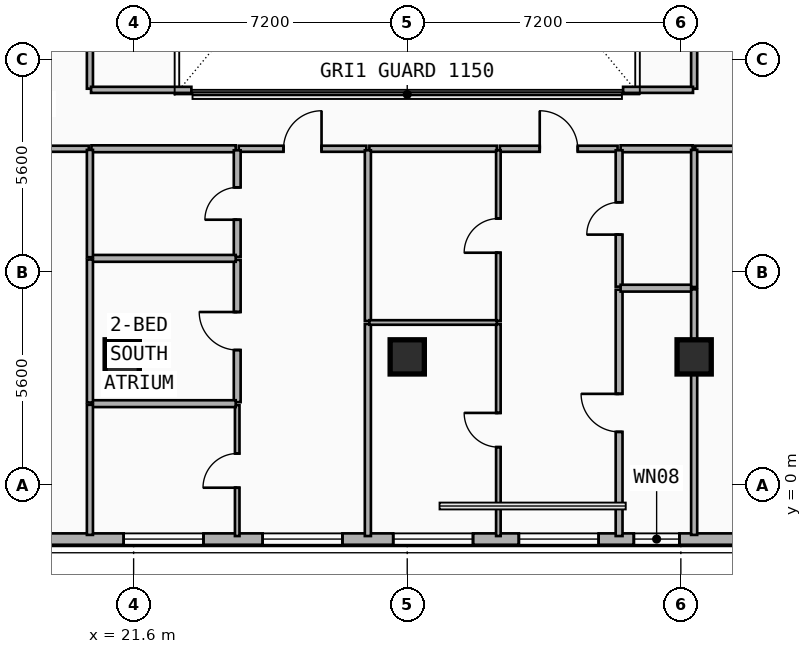
"""IFC4 building model, lengths in metres.
Left out: names, types, materials, properties, quantities, classifications, styles, units other than length and angle.
Written with IfcOpenShell. Run it as: python <this file> out.ifc"""

import sys

from ifc_helpers import new_model, si_unit, direction, frame, frame_2d, origin, origin_2d, place, context, subcontext, project, spatial, rectangle, extrude, element, fill, save


model = new_model("IFC4")
c1 = context("Model", 3, precision=1e-05, world=origin(), true_north=direction((0.0, 1.0)))
c2 = subcontext(c1, "Body", "Model", "MODEL_VIEW")
j1 = project(units=[si_unit("LENGTHUNIT", "METRE"), si_unit("PLANEANGLEUNIT", "RADIAN")], contexts=[c1])
p1 = place(None, origin())
s1 = spatial("IfcSite", under=j1, at=p1, CompositionType="ELEMENT")
p2 = place(p1, origin())
s2 = spatial("IfcBuilding", under=s1, at=p2, CompositionType="ELEMENT")
p3 = place(p2, frame((0.0, 0.0, 251.0)))
s3 = spatial("IfcBuildingStorey", under=s2, at=p3, CompositionType="ELEMENT", Elevation=251.0)
for number, where, z_axis, x_axis in (
    (1, (21.3, 3.482, 0.0), (0.0, -0.09, 0.996), (1.0, 0.0, 0.0)),
    (2, (28.8, 3.482, 0.0), (0.0, -0.09, 0.996), (1.0, 0.0, 0.0)),
    (3, (36.35, 3.482, 0.0), (0.0, -0.09, 0.996), (1.0, 0.0, 0.0)),
):
    element("IfcColumn", number, at=place(p3, frame(where, z_axis=z_axis, x_axis=x_axis)), inside=s3, PredefinedType="COLUMN", context=c2, shape_type="SweptSolid", body=[
        extrude(rectangle(XDim=0.9, YDim=0.9, at=origin_2d()), origin(), (0.0, 0.0, 1.0), 3.715),
    ])
p4 = place(p3, frame((45.2, -1.42, 0.0), z_axis=(0.0, 0.0, 1.0), x_axis=(-1.0, 0.0, 0.0)))
e4 = element("IfcWall", 4, at=p4, inside=s3, PredefinedType="SOLIDWALL", context=c2, shape_type="SweptSolid", body=[
    extrude(rectangle(XDim=32.8, YDim=0.3, at=frame_2d((16.4, 0.0))), origin(), (0.0, 0.0, 1.0), 3.42),
])
p5 = place(p4, frame((29.071, 0.0, 0.75)))
e5 = element("IfcOpeningElement", 5, at=p5, cuts=e4, PredefinedType="OPENING", context=c2, shape_type="SweptSolid", body=[
    extrude(rectangle(XDim=2.1, YDim=2.1, at=frame_2d((1.05, 1.05))), frame((0.0, 0.16, 0.0), z_axis=(0.0, -1.0, 0.0), x_axis=(1.0, 0.0, 0.0)), (0.0, 0.0, 1.0), 0.32),
])
p6 = place(p4, frame((26.745, 0.0, 0.75)))
e6 = element("IfcOpeningElement", 6, at=p6, cuts=e4, PredefinedType="OPENING", context=c2, shape_type="SweptSolid", body=[
    extrude(rectangle(XDim=1.6, YDim=1.95, at=frame_2d((0.8, 0.975))), frame((0.0, 0.16, 0.0), z_axis=(0.0, -1.0, 0.0), x_axis=(1.0, 0.0, 0.0)), (0.0, 0.0, 1.0), 0.32),
])
p7 = place(p4, frame((18.105, 0.0, 0.75)))
e7 = element("IfcOpeningElement", 7, at=p7, cuts=e4, PredefinedType="OPENING", context=c2, shape_type="SweptSolid", body=[
    extrude(rectangle(XDim=2.1, YDim=2.1, at=frame_2d((1.05, 1.05))), frame((0.0, 0.16, 0.0), z_axis=(0.0, -1.0, 0.0), x_axis=(1.0, 0.0, 0.0)), (0.0, 0.0, 1.0), 0.32),
])
p8 = place(p4, frame((21.762, 0.0, 0.75)))
e8 = element("IfcOpeningElement", 8, at=p8, cuts=e4, PredefinedType="OPENING", context=c2, shape_type="SweptSolid", body=[
    extrude(rectangle(XDim=2.1, YDim=2.1, at=frame_2d((1.05, 1.05))), frame((0.0, 0.16, 0.0), z_axis=(0.0, -1.0, 0.0), x_axis=(1.0, 0.0, 0.0)), (0.0, 0.0, 1.0), 0.32),
])
p9 = place(p4, frame((11.364, 0.0, 0.75)))
e9 = element("IfcOpeningElement", 9, at=p9, cuts=e4, PredefinedType="OPENING", context=c2, shape_type="SweptSolid", body=[
    extrude(rectangle(XDim=2.1, YDim=2.1, at=frame_2d((1.05, 1.05))), frame((0.0, 0.16, 0.0), z_axis=(0.0, -1.0, 0.0), x_axis=(1.0, 0.0, 0.0)), (0.0, 0.0, 1.0), 0.32),
])
p10 = place(p4, frame((9.238, 0.0, 0.68)))
e10 = element("IfcOpeningElement", 10, at=p10, cuts=e4, PredefinedType="OPENING", context=c2, shape_type="SweptSolid", body=[
    extrude(rectangle(XDim=1.2, YDim=1.5, at=frame_2d((0.6, 0.75))), frame((0.0, 0.16, 0.0), z_axis=(0.0, -1.0, 0.0), x_axis=(1.0, 0.0, 0.0)), (0.0, 0.0, 1.0), 0.32),
])
p11 = place(p4, frame((14.669, 0.0, 0.75)))
e11 = element("IfcOpeningElement", 11, at=p11, cuts=e4, PredefinedType="OPENING", context=c2, shape_type="SweptSolid", body=[
    extrude(rectangle(XDim=2.1, YDim=2.1, at=frame_2d((1.05, 1.05))), frame((0.0, 0.16, 0.0), z_axis=(0.0, -1.0, 0.0), x_axis=(1.0, 0.0, 0.0)), (0.0, 0.0, 1.0), 0.32),
])
p12 = place(p4, frame((1.937, 0.0, 0.75)))
e12 = element("IfcOpeningElement", 12, at=p12, cuts=e4, PredefinedType="OPENING", context=c2, shape_type="SweptSolid", body=[
    extrude(rectangle(XDim=2.1, YDim=2.1, at=frame_2d((1.05, 1.05))), frame((0.0, 0.16, 0.0), z_axis=(0.0, -1.0, 0.0), x_axis=(1.0, 0.0, 0.0)), (0.0, 0.0, 1.0), 0.32),
])
p13 = place(p4, frame((4.709, 0.0, 0.8)))
e13 = element("IfcOpeningElement", 13, at=p13, cuts=e4, PredefinedType="OPENING", context=c2, shape_type="SweptSolid", body=[
    extrude(rectangle(XDim=1.8, YDim=1.8, at=frame_2d((0.9, 0.9))), frame((0.0, 0.16, 0.0), z_axis=(0.0, -1.0, 0.0), x_axis=(1.0, 0.0, 0.0)), (0.0, 0.0, 1.0), 0.32),
])
p14 = place(p3, frame((24.366, 8.85, 0.0), z_axis=(0.0, 0.0, 1.0), x_axis=(1.0, 0.0, 0.0)))
e14 = element("IfcWall", 14, at=p14, inside=s3, PredefinedType="PARTITIONING", context=c2, shape_type="SweptSolid", body=[
    extrude(rectangle(XDim=3.358, YDim=0.16, at=frame_2d((1.679, 0.0))), origin(), (0.0, 0.0, 1.0), 3.42),
])
p15 = place(p14, frame((1.179, 0.0, 0.0)))
e15 = element("IfcOpeningElement", 15, at=p15, cuts=e14, PredefinedType="OPENING", context=c2, shape_type="SweptSolid", body=[
    extrude(rectangle(XDim=1.0, YDim=2.15, at=frame_2d((0.5, 1.075))), frame((0.0, 0.09, 0.0), z_axis=(0.0, -1.0, 0.0), x_axis=(1.0, 0.0, 0.0)), (0.0, 0.0, 1.0), 0.18),
])
p16 = place(p3, frame((20.49, 8.85, 0.0), z_axis=(0.0, 0.0, 1.0), x_axis=(1.0, 0.0, 0.0)))
e16 = element("IfcWall", 16, at=p16, inside=s3, PredefinedType="PLUMBINGWALL", context=c2, shape_type="SweptSolid", body=[
    extrude(rectangle(XDim=3.796, YDim=0.18, at=frame_2d((1.898, 0.0))), origin(), (0.0, 0.0, 1.0), 2.7),
])
p17 = place(p3, frame((31.238, 8.85, 0.0), z_axis=(0.0, 0.0, 1.0), x_axis=(1.0, 0.0, 0.0)))
e17 = element("IfcWall", 17, at=p17, inside=s3, PredefinedType="PARTITIONING", context=c2, shape_type="SweptSolid", body=[
    extrude(rectangle(XDim=3.097, YDim=0.16, at=frame_2d((1.548, 0.0))), origin(), (0.0, 0.0, 1.0), 3.42),
])
p18 = place(p17, frame((1.049, 0.0, 0.0)))
e18 = element("IfcOpeningElement", 18, at=p18, cuts=e17, PredefinedType="OPENING", context=c2, shape_type="SweptSolid", body=[
    extrude(rectangle(XDim=1.0, YDim=2.15, at=frame_2d((0.5, 1.075))), frame((0.0, 0.09, 0.0), z_axis=(0.0, -1.0, 0.0), x_axis=(1.0, 0.0, 0.0)), (0.0, 0.0, 1.0), 0.18),
])
p19 = place(p3, frame((34.415, 8.85, 0.0), z_axis=(0.0, 0.0, 1.0), x_axis=(1.0, 0.0, 0.0)))
e19 = element("IfcWall", 19, at=p19, inside=s3, PredefinedType="PLUMBINGWALL", context=c2, shape_type="SweptSolid", body=[
    extrude(rectangle(XDim=1.895, YDim=0.18, at=frame_2d((0.948, 0.0))), origin(), (0.0, 0.0, 1.0), 2.7),
])
p20 = place(p3, frame((27.804, 8.85, 0.0), z_axis=(0.0, 0.0, 1.0), x_axis=(1.0, 0.0, 0.0)))
e20 = element("IfcWall", 20, at=p20, inside=s3, PredefinedType="PARTITIONING", context=c2, shape_type="SweptSolid", body=[
    extrude(rectangle(XDim=3.354, YDim=0.16, at=frame_2d((1.677, 0.0))), origin(), (0.0, 0.0, 1.0), 2.7),
])
p21 = place(p3, frame((24.326, -1.34, 0.0), z_axis=(0.0, 0.0, 1.0), x_axis=(0.0, 1.0, 0.0)))
e21 = element("IfcWall", 21, at=p21, inside=s3, PredefinedType="PARTITIONING", context=c2, shape_type="SweptSolid", body=[
    extrude(rectangle(XDim=3.443, YDim=0.12, at=frame_2d((1.722, 0.0))), origin(), (0.0, 0.0, 1.0), 3.42),
])
p22 = place(p21, frame((1.271, 0.0, 0.0)))
e22 = element("IfcOpeningElement", 22, at=p22, cuts=e21, PredefinedType="OPENING", context=c2, shape_type="SweptSolid", body=[
    extrude(rectangle(XDim=0.9, YDim=2.1, at=frame_2d((0.45, 1.05))), frame((0.0, 0.07, 0.0), z_axis=(0.0, -1.0, 0.0), x_axis=(1.0, 0.0, 0.0)), (0.0, 0.0, 1.0), 0.14),
])
p23 = place(p3, frame((24.326, 2.183, 0.0), z_axis=(0.0, 0.0, 1.0), x_axis=(0.0, 1.0, 0.0)))
e23 = element("IfcWall", 23, at=p23, inside=s3, PredefinedType="PLUMBINGWALL", context=c2, shape_type="SweptSolid", body=[
    extrude(rectangle(XDim=3.743, YDim=0.18, at=frame_2d((1.872, 0.0))), origin(), (0.0, 0.0, 1.0), 3.08),
])
p24 = place(p23, frame((1.372, 0.0, 0.0)))
e24 = element("IfcOpeningElement", 24, at=p24, cuts=e23, PredefinedType="OPENING", context=c2, shape_type="SweptSolid", body=[
    extrude(rectangle(XDim=1.0, YDim=2.15, at=frame_2d((0.5, 1.075))), frame((0.0, 0.1, 0.0), z_axis=(0.0, -1.0, 0.0), x_axis=(1.0, 0.0, 0.0)), (0.0, 0.0, 1.0), 0.2),
])
p25 = place(p3, frame((24.326, 6.006, 0.0), z_axis=(0.0, 0.0, 1.0), x_axis=(0.0, 1.0, 0.0)))
e25 = element("IfcWall", 25, at=p25, inside=s3, PredefinedType="PLUMBINGWALL", context=c2, shape_type="SweptSolid", body=[
    extrude(rectangle(XDim=2.804, YDim=0.18, at=frame_2d((1.402, 0.0))), origin(), (0.0, 0.0, 1.0), 3.04),
])
p26 = place(p25, frame((0.977, 0.0, 0.0)))
e26 = element("IfcOpeningElement", 26, at=p26, cuts=e25, PredefinedType="OPENING", context=c2, shape_type="SweptSolid", body=[
    extrude(rectangle(XDim=0.85, YDim=2.1, at=frame_2d((0.425, 1.05))), frame((0.0, 0.1, 0.0), z_axis=(0.0, -1.0, 0.0), x_axis=(1.0, 0.0, 0.0)), (0.0, 0.0, 1.0), 0.2),
])
p27 = place(p3, frame((27.764, -1.34, 0.0), z_axis=(0.0, 0.0, 1.0), x_axis=(0.0, 1.0, 0.0)))
e27 = element("IfcWall", 27, at=p27, inside=s3, PredefinedType="PARTITIONING", context=c2, shape_type="SweptSolid", body=[
    extrude(rectangle(XDim=5.579, YDim=0.16, at=frame_2d((2.79, 0.0))), origin(), (0.0, 0.0, 1.0), 3.08),
])
p28 = place(p3, frame((27.764, 4.319, 0.0), z_axis=(0.0, 0.0, 1.0), x_axis=(0.0, 1.0, 0.0)))
e28 = element("IfcWall", 28, at=p28, inside=s3, PredefinedType="PARTITIONING", context=c2, shape_type="SweptSolid", body=[
    extrude(rectangle(XDim=4.491, YDim=0.16, at=frame_2d((2.246, 0.0))), origin(), (0.0, 0.0, 1.0), 3.04),
])
p29 = place(p3, frame((20.49, 2.143, 0.0), z_axis=(0.0, 0.0, 1.0), x_axis=(1.0, 0.0, 0.0)))
e29 = element("IfcWall", 29, at=p29, inside=s3, PredefinedType="PLUMBINGWALL", context=c2, shape_type="SweptSolid", body=[
    extrude(rectangle(XDim=3.796, YDim=0.18, at=frame_2d((1.898, 0.0))), origin(), (0.0, 0.0, 1.0), 3.42),
])
p30 = place(p3, frame((20.49, 5.966, 0.0), z_axis=(0.0, 0.0, 1.0), x_axis=(1.0, 0.0, 0.0)))
e30 = element("IfcWall", 30, at=p30, inside=s3, PredefinedType="PLUMBINGWALL", context=c2, shape_type="SweptSolid", body=[
    extrude(rectangle(XDim=3.796, YDim=0.18, at=frame_2d((1.898, 0.0))), origin(), (0.0, 0.0, 1.0), 2.7),
])
p31 = place(p3, frame((34.375, -1.34, 0.0), z_axis=(0.0, 0.0, 1.0), x_axis=(0.0, 1.0, 0.0)))
e31 = element("IfcWall", 31, at=p31, inside=s3, PredefinedType="PLUMBINGWALL", context=c2, shape_type="SweptSolid", body=[
    extrude(rectangle(XDim=6.482, YDim=0.18, at=frame_2d((3.241, 0.0))), origin(), (0.0, 0.0, 1.0), 3.08),
])
p32 = place(p31, frame((2.741, 0.0, 0.0)))
e32 = element("IfcOpeningElement", 32, at=p32, cuts=e31, PredefinedType="OPENING", context=c2, shape_type="SweptSolid", body=[
    extrude(rectangle(XDim=1.0, YDim=2.15, at=frame_2d((0.5, 1.075))), frame((0.0, 0.1, 0.0), z_axis=(0.0, -1.0, 0.0), x_axis=(1.0, 0.0, 0.0)), (0.0, 0.0, 1.0), 0.2),
])
p33 = place(p3, frame((34.375, 5.222, 0.0), z_axis=(0.0, 0.0, 1.0), x_axis=(0.0, 1.0, 0.0)))
e33 = element("IfcWall", 33, at=p33, inside=s3, PredefinedType="PLUMBINGWALL", context=c2, shape_type="SweptSolid", body=[
    extrude(rectangle(XDim=3.588, YDim=0.18, at=frame_2d((1.794, 0.0))), origin(), (0.0, 0.0, 1.0), 3.04),
])
p34 = place(p33, frame((1.369, 0.0, 0.0)))
e34 = element("IfcOpeningElement", 34, at=p34, cuts=e33, PredefinedType="OPENING", context=c2, shape_type="SweptSolid", body=[
    extrude(rectangle(XDim=0.85, YDim=2.1, at=frame_2d((0.425, 1.05))), frame((0.0, 0.1, 0.0), z_axis=(0.0, -1.0, 0.0), x_axis=(1.0, 0.0, 0.0)), (0.0, 0.0, 1.0), 0.2),
])
p35 = place(p3, frame((31.198, -1.34, 0.0), z_axis=(0.0, 0.0, 1.0), x_axis=(0.0, 1.0, 0.0)))
e35 = element("IfcWall", 35, at=p35, inside=s3, PredefinedType="PARTITIONING", context=c2, shape_type="SweptSolid", body=[
    extrude(rectangle(XDim=5.579, YDim=0.12, at=frame_2d((2.79, 0.0))), origin(), (0.0, 0.0, 1.0), 3.08),
])
p36 = place(p35, frame((2.34, 0.0, 0.0)))
e36 = element("IfcOpeningElement", 36, at=p36, cuts=e35, PredefinedType="OPENING", context=c2, shape_type="SweptSolid", body=[
    extrude(rectangle(XDim=0.9, YDim=2.1, at=frame_2d((0.45, 1.05))), frame((0.0, 0.07, 0.0), z_axis=(0.0, -1.0, 0.0), x_axis=(1.0, 0.0, 0.0)), (0.0, 0.0, 1.0), 0.14),
])
p37 = place(p3, frame((31.198, 4.319, 0.0), z_axis=(0.0, 0.0, 1.0), x_axis=(0.0, 1.0, 0.0)))
e37 = element("IfcWall", 37, at=p37, inside=s3, PredefinedType="PARTITIONING", context=c2, shape_type="SweptSolid", body=[
    extrude(rectangle(XDim=4.491, YDim=0.12, at=frame_2d((2.246, 0.0))), origin(), (0.0, 0.0, 1.0), 3.04),
])
p38 = place(p37, frame((1.795, 0.0, 0.0)))
e38 = element("IfcOpeningElement", 38, at=p38, cuts=e37, PredefinedType="OPENING", context=c2, shape_type="SweptSolid", body=[
    extrude(rectangle(XDim=0.9, YDim=2.1, at=frame_2d((0.45, 1.05))), frame((0.0, 0.07, 0.0), z_axis=(0.0, -1.0, 0.0), x_axis=(1.0, 0.0, 0.0)), (0.0, 0.0, 1.0), 0.14),
])
p39 = place(p3, frame((34.415, 5.182, 0.0), z_axis=(0.0, 0.0, 1.0), x_axis=(1.0, 0.0, 0.0)))
e39 = element("IfcWall", 39, at=p39, inside=s3, PredefinedType="PLUMBINGWALL", context=c2, shape_type="SweptSolid", body=[
    extrude(rectangle(XDim=1.895, YDim=0.18, at=frame_2d((0.948, 0.0))), origin(), (0.0, 0.0, 1.0), 2.7),
])
p40 = place(p3, frame((27.804, 4.279, 0.0), z_axis=(0.0, 0.0, 1.0), x_axis=(1.0, 0.0, 0.0)))
e40 = element("IfcWall", 40, at=p40, inside=s3, PredefinedType="PARTITIONING", context=c2, shape_type="SweptSolid", body=[
    extrude(rectangle(XDim=3.354, YDim=0.12, at=frame_2d((1.677, 0.0))), origin(), (0.0, 0.0, 1.0), 2.7),
])
p41 = place(p3, frame((18.88, 8.85, 0.0), z_axis=(0.0, 0.0, 1.0), x_axis=(1.0, 0.0, 0.0)))
e41 = element("IfcWall", 41, at=p41, inside=s3, PredefinedType="PARTITIONING", context=c2, shape_type="SweptSolid", body=[
    extrude(rectangle(XDim=1.54, YDim=0.16, at=frame_2d((0.77, 0.0))), origin(), (0.0, 0.0, 1.0), 3.42),
])
p42 = place(p3, frame((20.45, 10.43, 0.0), z_axis=(0.0, 0.0, 1.0), x_axis=(0.0, 1.0, 0.0)))
e42 = element("IfcWall", 42, at=p42, inside=s3, PredefinedType="PARTITIONING", context=c2, shape_type="SweptSolid", body=[
    extrude(rectangle(XDim=14.99, YDim=0.16, at=frame_2d((7.495, 0.0))), origin(), (0.0, 0.0, 1.0), 2.9),
])
p43 = place(p3, frame((36.38, 8.85, 0.0), z_axis=(0.0, 0.0, 1.0), x_axis=(1.0, 0.0, 0.0)))
e43 = element("IfcWall", 43, at=p43, inside=s3, PredefinedType="PARTITIONING", context=c2, shape_type="SweptSolid", body=[
    extrude(rectangle(XDim=1.94, YDim=0.16, at=frame_2d((0.97, 0.0))), origin(), (0.0, 0.0, 1.0), 2.7),
])
p44 = place(p3, frame((36.35, 10.43, 0.0), z_axis=(0.0, 0.0, 1.0), x_axis=(0.0, 1.0, 0.0)))
e44 = element("IfcWall", 44, at=p44, inside=s3, PredefinedType="PARTITIONING", context=c2, shape_type="SweptSolid", body=[
    extrude(rectangle(XDim=14.99, YDim=0.16, at=frame_2d((7.495, 0.0))), origin(), (0.0, 0.0, 1.0), 2.7),
])
p45 = place(p3, frame((20.48, 10.4, 0.0), z_axis=(0.0, 0.0, 1.0), x_axis=(1.0, 0.0, 0.0)))
e45 = element("IfcWall", 45, at=p45, inside=s3, PredefinedType="PARTITIONING", context=c2, shape_type="SweptSolid", body=[
    extrude(rectangle(XDim=2.64, YDim=0.16, at=frame_2d((1.32, 0.0))), origin(), (0.0, 0.0, 1.0), 2.7),
])
p46 = place(p3, frame((34.48, 10.4, 0.0), z_axis=(0.0, 0.0, 1.0), x_axis=(1.0, 0.0, 0.0)))
e46 = element("IfcWall", 46, at=p46, inside=s3, PredefinedType="PARTITIONING", context=c2, shape_type="SweptSolid", body=[
    extrude(rectangle(XDim=1.84, YDim=0.16, at=frame_2d((0.92, 0.0))), origin(), (0.0, 0.0, 1.0), 2.7),
])
p47 = place(p3, frame((20.45, -1.31, 0.0), z_axis=(0.0, 0.0, 1.0), x_axis=(0.0, 1.0, 0.0)))
e47 = element("IfcWall", 47, at=p47, inside=s3, PredefinedType="PARTITIONING", context=c2, shape_type="SweptSolid", body=[
    extrude(rectangle(XDim=3.423, YDim=0.16, at=frame_2d((1.711, 0.0))), origin(), (0.0, 0.0, 1.0), 3.42),
])
p48 = place(p3, frame((20.45, 2.173, 0.0), z_axis=(0.0, 0.0, 1.0), x_axis=(0.0, 1.0, 0.0)))
e48 = element("IfcWall", 48, at=p48, inside=s3, PredefinedType="PARTITIONING", context=c2, shape_type="SweptSolid", body=[
    extrude(rectangle(XDim=3.763, YDim=0.16, at=frame_2d((1.881, 0.0))), origin(), (0.0, 0.0, 1.0), 3.08),
])
p49 = place(p3, frame((20.45, 5.996, 0.0), z_axis=(0.0, 0.0, 1.0), x_axis=(0.0, 1.0, 0.0)))
e49 = element("IfcWall", 49, at=p49, inside=s3, PredefinedType="PARTITIONING", context=c2, shape_type="SweptSolid", body=[
    extrude(rectangle(XDim=2.824, YDim=0.16, at=frame_2d((1.412, 0.0))), origin(), (0.0, 0.0, 1.0), 3.05),
])
p50 = place(p3, frame((36.35, -1.31, 0.0), z_axis=(0.0, 0.0, 1.0), x_axis=(0.0, 1.0, 0.0)))
e50 = element("IfcWall", 50, at=p50, inside=s3, PredefinedType="PARTITIONING", context=c2, shape_type="SweptSolid", body=[
    extrude(rectangle(XDim=6.462, YDim=0.16, at=frame_2d((3.231, 0.0))), origin(), (0.0, 0.0, 1.0), 2.7),
])
p51 = place(p3, frame((36.35, 5.212, 0.0), z_axis=(0.0, 0.0, 1.0), x_axis=(0.0, 1.0, 0.0)))
e51 = element("IfcWall", 51, at=p51, inside=s3, PredefinedType="PARTITIONING", context=c2, shape_type="SweptSolid", body=[
    extrude(rectangle(XDim=3.608, YDim=0.16, at=frame_2d((1.804, 0.0))), origin(), (0.0, 0.0, 1.0), 2.7),
])
p52 = place(p7, origin())
e52 = element("IfcWindow", 52, at=p52, inside=s3, PartitioningType="SINGLE_PANEL", PredefinedType="WINDOW", context=c2, shape_type="SweptSolid", body=[
    extrude(rectangle(XDim=2.1, YDim=2.1, at=frame_2d((1.05, 1.05))), frame((0.0, 0.03, 0.0), z_axis=(0.0, -1.0, 0.0), x_axis=(1.0, 0.0, 0.0)), (0.0, 0.0, 1.0), 0.06),
])
fill(e7, e52)
p53 = place(p8, origin())
e53 = element("IfcWindow", 53, at=p53, inside=s3, PartitioningType="SINGLE_PANEL", PredefinedType="WINDOW", context=c2, shape_type="SweptSolid", body=[
    extrude(rectangle(XDim=2.1, YDim=2.1, at=frame_2d((1.05, 1.05))), frame((0.0, 0.03, 0.0), z_axis=(0.0, -1.0, 0.0), x_axis=(1.0, 0.0, 0.0)), (0.0, 0.0, 1.0), 0.06),
])
fill(e8, e53)
p54 = place(p9, origin())
e54 = element("IfcWindow", 54, at=p54, inside=s3, PartitioningType="SINGLE_PANEL", PredefinedType="WINDOW", context=c2, shape_type="SweptSolid", body=[
    extrude(rectangle(XDim=2.1, YDim=2.1, at=frame_2d((1.05, 1.05))), frame((0.0, 0.03, 0.0), z_axis=(0.0, -1.0, 0.0), x_axis=(1.0, 0.0, 0.0)), (0.0, 0.0, 1.0), 0.06),
])
fill(e9, e54)
p55 = place(p10, origin())
e55 = element("IfcWindow", 55, at=p55, inside=s3, PartitioningType="SINGLE_PANEL", PredefinedType="WINDOW", context=c2, shape_type="SweptSolid", body=[
    extrude(rectangle(XDim=1.2, YDim=1.5, at=frame_2d((0.6, 0.75))), frame((0.0, 0.03, 0.0), z_axis=(0.0, -1.0, 0.0), x_axis=(1.0, 0.0, 0.0)), (0.0, 0.0, 1.0), 0.06),
])
fill(e10, e55)
p56 = place(p11, origin())
e56 = element("IfcWindow", 56, at=p56, inside=s3, PartitioningType="SINGLE_PANEL", PredefinedType="WINDOW", context=c2, shape_type="SweptSolid", body=[
    extrude(rectangle(XDim=2.1, YDim=2.1, at=frame_2d((1.05, 1.05))), frame((0.0, 0.03, 0.0), z_axis=(0.0, -1.0, 0.0), x_axis=(1.0, 0.0, 0.0)), (0.0, 0.0, 1.0), 0.06),
])
fill(e11, e56)
p57 = place(p15, origin())
e57 = element("IfcDoor", 57, at=p57, inside=s3, OperationType="SINGLE_SWING_RIGHT", PredefinedType="DOOR", context=c2, shape_type="SweptSolid", body=[
    extrude(rectangle(XDim=1.0, YDim=2.15, at=frame_2d((0.5, 1.075))), frame((0.0, 0.025, 0.0), z_axis=(0.0, -1.0, 0.0), x_axis=(1.0, 0.0, 0.0)), (0.0, 0.0, 1.0), 0.05),
])
fill(e15, e57)
p58 = place(p18, origin())
e58 = element("IfcDoor", 58, at=p58, inside=s3, OperationType="SINGLE_SWING_LEFT", PredefinedType="DOOR", context=c2, shape_type="SweptSolid", body=[
    extrude(rectangle(XDim=1.0, YDim=2.15, at=frame_2d((0.5, 1.075))), frame((0.0, 0.025, 0.0), z_axis=(0.0, -1.0, 0.0), x_axis=(1.0, 0.0, 0.0)), (0.0, 0.0, 1.0), 0.05),
])
fill(e18, e58)
p59 = place(p22, origin())
e59 = element("IfcDoor", 59, at=p59, inside=s3, OperationType="SINGLE_SWING_LEFT", PredefinedType="DOOR", context=c2, shape_type="SweptSolid", body=[
    extrude(rectangle(XDim=0.9, YDim=2.1, at=frame_2d((0.45, 1.05))), frame((0.0, 0.025, 0.0), z_axis=(0.0, -1.0, 0.0), x_axis=(1.0, 0.0, 0.0)), (0.0, 0.0, 1.0), 0.05),
])
fill(e22, e59)
p60 = place(p24, origin())
e60 = element("IfcDoor", 60, at=p60, inside=s3, OperationType="SINGLE_SWING_RIGHT", PredefinedType="DOOR", context=c2, shape_type="SweptSolid", body=[
    extrude(rectangle(XDim=1.0, YDim=2.15, at=frame_2d((0.5, 1.075))), frame((0.0, 0.025, 0.0), z_axis=(0.0, -1.0, 0.0), x_axis=(1.0, 0.0, 0.0)), (0.0, 0.0, 1.0), 0.05),
])
fill(e24, e60)
p61 = place(p26, origin())
e61 = element("IfcDoor", 61, at=p61, inside=s3, OperationType="SINGLE_SWING_LEFT", PredefinedType="DOOR", context=c2, shape_type="SweptSolid", body=[
    extrude(rectangle(XDim=0.85, YDim=2.1, at=frame_2d((0.425, 1.05))), frame((0.0, 0.025, 0.0), z_axis=(0.0, -1.0, 0.0), x_axis=(1.0, 0.0, 0.0)), (0.0, 0.0, 1.0), 0.05),
])
fill(e26, e61)
p62 = place(p32, origin())
e62 = element("IfcDoor", 62, at=p62, inside=s3, OperationType="SINGLE_SWING_RIGHT", PredefinedType="DOOR", context=c2, shape_type="SweptSolid", body=[
    extrude(rectangle(XDim=1.0, YDim=2.15, at=frame_2d((0.5, 1.075))), frame((0.0, 0.025, 0.0), z_axis=(0.0, -1.0, 0.0), x_axis=(1.0, 0.0, 0.0)), (0.0, 0.0, 1.0), 0.05),
])
fill(e32, e62)
p63 = place(p34, origin())
e63 = element("IfcDoor", 63, at=p63, inside=s3, OperationType="SINGLE_SWING_LEFT", PredefinedType="DOOR", context=c2, shape_type="SweptSolid", body=[
    extrude(rectangle(XDim=0.85, YDim=2.1, at=frame_2d((0.425, 1.05))), frame((0.0, 0.025, 0.0), z_axis=(0.0, -1.0, 0.0), x_axis=(1.0, 0.0, 0.0)), (0.0, 0.0, 1.0), 0.05),
])
fill(e34, e63)
p64 = place(p36, origin())
e64 = element("IfcDoor", 64, at=p64, inside=s3, OperationType="SINGLE_SWING_RIGHT", PredefinedType="DOOR", context=c2, shape_type="SweptSolid", body=[
    extrude(rectangle(XDim=0.9, YDim=2.1, at=frame_2d((0.45, 1.05))), frame((0.0, 0.025, 0.0), z_axis=(0.0, -1.0, 0.0), x_axis=(1.0, 0.0, 0.0)), (0.0, 0.0, 1.0), 0.05),
])
fill(e36, e64)
p65 = place(p38, origin())
e65 = element("IfcDoor", 65, at=p65, inside=s3, OperationType="SINGLE_SWING_LEFT", PredefinedType="DOOR", context=c2, shape_type="SweptSolid", body=[
    extrude(rectangle(XDim=0.9, YDim=2.1, at=frame_2d((0.45, 1.05))), frame((0.0, 0.025, 0.0), z_axis=(0.0, -1.0, 0.0), x_axis=(1.0, 0.0, 0.0)), (0.0, 0.0, 1.0), 0.05),
])
fill(e38, e65)
save(model, sys.argv[1])
